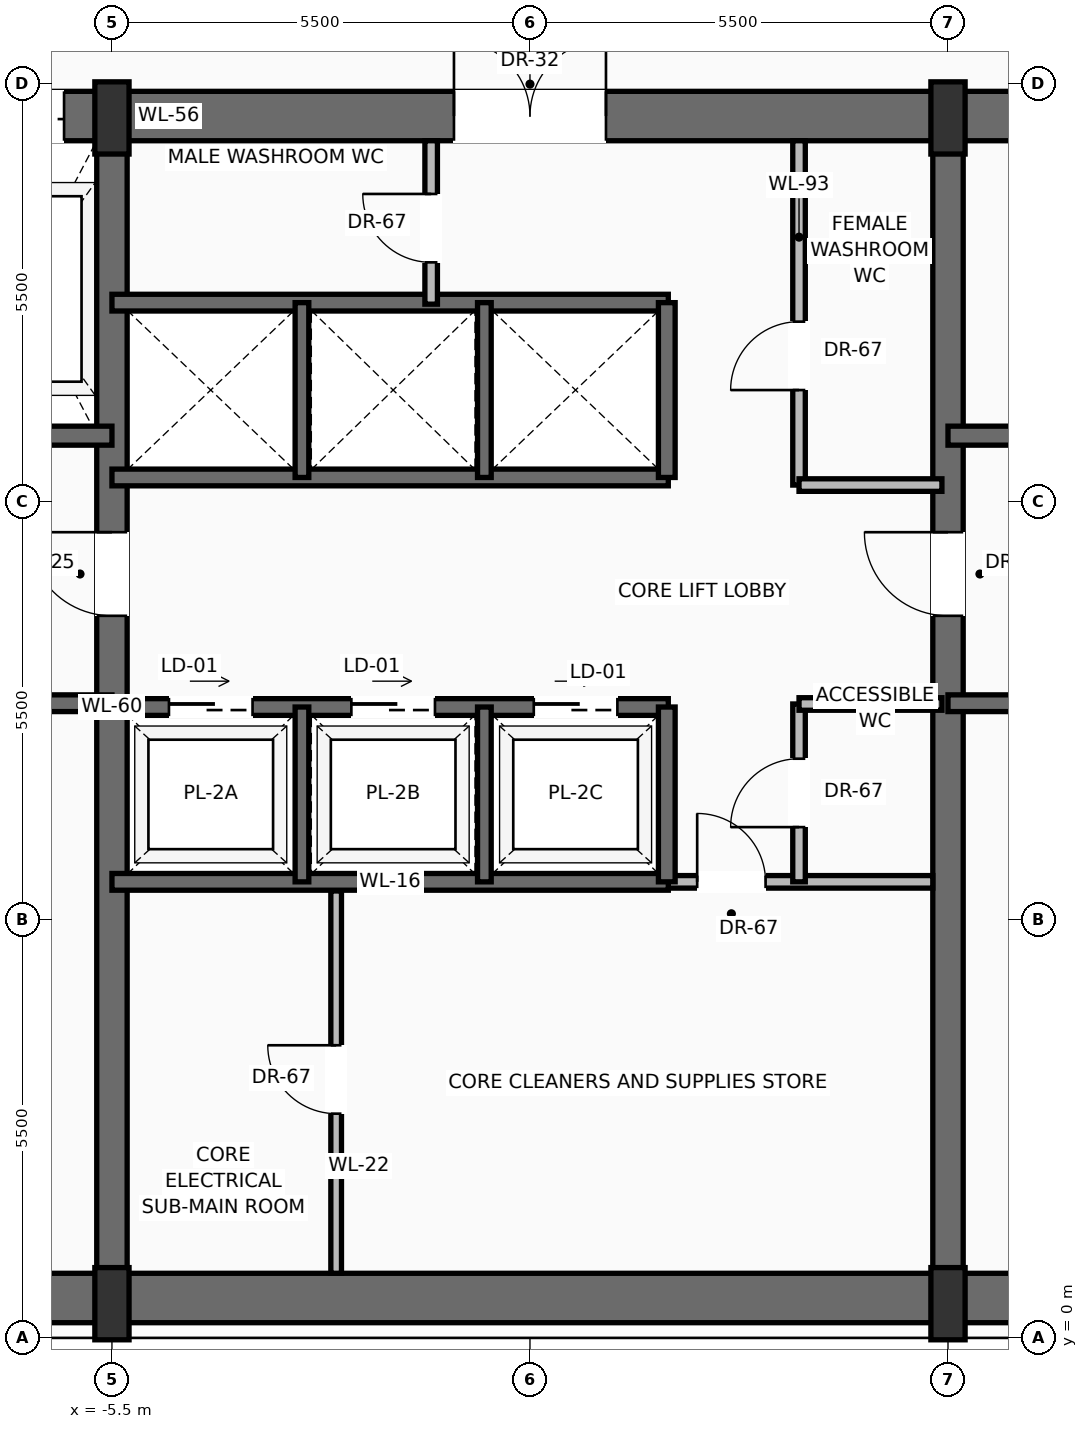
"""IFC4 building model, lengths in metres.
Left out: names, types, materials, properties, quantities, classifications, styles, units other than length and angle.
Written with IfcOpenShell. Run it as: python <this file> out.ifc"""

import sys

from ifc_helpers import new_model, si_unit, direction, frame, frame_2d, origin, origin_2d, place, context, subcontext, project, spatial, rectangle, extrude, source, transform, mapped, element, fill, save


model = new_model("IFC4")
c1 = context("Model", 3, precision=1e-05, world=origin(), true_north=direction((0.0, 1.0)))
c2 = subcontext(c1, "Body", "Model", "MODEL_VIEW")
j1 = project(units=[si_unit("LENGTHUNIT", "METRE"), si_unit("PLANEANGLEUNIT", "RADIAN")], contexts=[c1])
p1 = place(None, origin())
s1 = spatial("IfcSite", under=j1, at=p1, CompositionType="ELEMENT")
p2 = place(p1, origin())
s2 = spatial("IfcBuilding", under=s1, at=p2, CompositionType="ELEMENT")
p3 = place(p2, frame((0.0, 0.0, 204.3)))
s3 = spatial("IfcBuildingStorey", under=s2, at=p3, CompositionType="ELEMENT", Elevation=204.3)
p4 = place(p3, frame((-10.65, 0.525, 0.0), z_axis=(0.0, 0.0, 1.0), x_axis=(1.0, 0.0, 0.0)))
e1 = element("IfcWall", 1, at=p4, inside=s3, PredefinedType="SHEAR", context=c2, shape_type="SweptSolid", body=[
    extrude(rectangle(XDim=21.3, YDim=0.65, at=frame_2d((10.65, 0.0))), origin(), (0.0, 0.0, 1.0), 3.47),
])
p5 = place(p3, frame((-10.8, 16.075, 0.0), z_axis=(0.0, 0.0, 1.0), x_axis=(1.0, 0.0, 0.0)))
e2 = element("IfcWall", 2, at=p5, inside=s3, PredefinedType="SHEAR", context=c2, shape_type="SweptSolid", body=[
    extrude(rectangle(XDim=21.6, YDim=0.65, at=frame_2d((10.8, 0.0))), origin(), (0.0, 0.0, 1.0), 3.47),
])
p6 = place(p5, frame((3.37, 0.0, 0.0)))
e3 = element("IfcOpeningElement", 3, at=p6, cuts=e2, PredefinedType="OPENING", context=c2, shape_type="SweptSolid", body=[
    extrude(rectangle(XDim=1.3, YDim=2.3, at=frame_2d((0.65, 1.15))), frame((0.0, 0.335, 0.0), z_axis=(0.0, -1.0, 0.0), x_axis=(1.0, 0.0, 0.0)), (0.0, 0.0, 1.0), 0.67),
])
p7 = place(p5, frame((9.8, 0.0, 0.0)))
e4 = element("IfcOpeningElement", 4, at=p7, cuts=e2, PredefinedType="OPENING", context=c2, shape_type="SweptSolid", body=[
    extrude(rectangle(XDim=2.0, YDim=2.4, at=frame_2d((1.0, 1.2))), frame((0.0, 0.335, 0.0), z_axis=(0.0, -1.0, 0.0), x_axis=(1.0, 0.0, 0.0)), (0.0, 0.0, 1.0), 0.67),
])
p8 = place(p3, frame((-5.5, 0.525, 0.0), z_axis=(0.0, 0.0, 1.0), x_axis=(0.0, 1.0, 0.0)))
e5 = element("IfcWall", 5, at=p8, inside=s3, PredefinedType="SHEAR", context=c2, shape_type="SweptSolid", body=[
    extrude(rectangle(XDim=15.55, YDim=0.4, at=frame_2d((7.775, 0.0))), origin(), (0.0, 0.0, 1.0), 3.47),
])
p9 = place(p8, frame((8.975, 0.0, 0.0)))
e6 = element("IfcOpeningElement", 6, at=p9, cuts=e5, PredefinedType="OPENING", context=c2, shape_type="SweptSolid", body=[
    extrude(rectangle(XDim=1.1, YDim=2.2, at=frame_2d((0.55, 1.1))), frame((0.0, 0.21, 0.0), z_axis=(0.0, -1.0, 0.0), x_axis=(1.0, 0.0, 0.0)), (0.0, 0.0, 1.0), 0.42),
])
p10 = place(p3, frame((5.5, 0.525, 0.0), z_axis=(0.0, 0.0, 1.0), x_axis=(0.0, 1.0, 0.0)))
e7 = element("IfcWall", 7, at=p10, inside=s3, PredefinedType="SHEAR", context=c2, shape_type="SweptSolid", body=[
    extrude(rectangle(XDim=15.55, YDim=0.4, at=frame_2d((7.775, 0.0))), origin(), (0.0, 0.0, 1.0), 3.47),
])
p11 = place(p10, frame((8.975, 0.0, 0.0)))
e8 = element("IfcOpeningElement", 8, at=p11, cuts=e7, PredefinedType="OPENING", context=c2, shape_type="SweptSolid", body=[
    extrude(rectangle(XDim=1.1, YDim=2.2, at=frame_2d((0.55, 1.1))), frame((0.0, 0.21, 0.0), z_axis=(0.0, -1.0, 0.0), x_axis=(1.0, 0.0, 0.0)), (0.0, 0.0, 1.0), 0.42),
])
m1 = source(origin(), c2, "Body", "SweptSolid", [
    extrude(rectangle(XDim=0.45, YDim=0.95, at=origin_2d()), origin(), (0.0, 0.0, 1.0), 3.7),
])
for number, where, z_axis, x_axis in (
    (9, (-5.5, 0.45, 0.0), (0.0, 0.0, 1.0), (1.0, 0.0, 0.0)),
    (10, (5.5, 0.45, 0.0), (0.0, 0.0, 1.0), (1.0, 0.0, 0.0)),
    (11, (-5.5, 16.05, 0.0), (0.0, 0.0, 1.0), (1.0, 0.0, 0.0)),
    (12, (5.5, 16.05, 0.0), (0.0, 0.0, 1.0), (1.0, 0.0, 0.0)),
):
    element("IfcColumn", number, at=place(p3, frame(where, z_axis=z_axis, x_axis=x_axis)), inside=s3, PredefinedType="PILASTER", context=c2, shape_type="MappedRepresentation", body=[
        mapped(m1, transform((0.0, 0.0, 0.0), scale=1.0)),
    ])
p12 = place(p3, frame((-5.5, 8.35, 0.0), z_axis=(0.0, 0.0, 1.0), x_axis=(-1.0, 0.0, 0.0)))
e13 = element("IfcWall", 13, at=p12, inside=s3, PredefinedType="SOLIDWALL", context=c2, shape_type="SweptSolid", body=[
    extrude(rectangle(XDim=4.65, YDim=0.22, at=frame_2d((2.325, 0.0))), origin(), (0.0, 0.0, 1.0), 3.47),
])
p13 = place(p12, frame((2.5, 0.0, 0.0)))
e14 = element("IfcOpeningElement", 14, at=p13, cuts=e13, PredefinedType="OPENING", context=c2, shape_type="SweptSolid", body=[
    extrude(rectangle(XDim=1.15, YDim=2.2, at=frame_2d((0.575, 1.1))), frame((0.0, 0.12, 0.0), z_axis=(0.0, -1.0, 0.0), x_axis=(1.0, 0.0, 0.0)), (0.0, 0.0, 1.0), 0.24),
])
p14 = place(p3, frame((-5.5, 11.87, 0.0), z_axis=(0.0, 0.0, 1.0), x_axis=(-1.0, 0.0, 0.0)))
e15 = element("IfcWall", 15, at=p14, inside=s3, PredefinedType="SOLIDWALL", context=c2, shape_type="SweptSolid", body=[
    extrude(rectangle(XDim=4.65, YDim=0.25, at=frame_2d((2.325, 0.0))), origin(), (0.0, 0.0, 1.0), 3.47),
])
p15 = place(p14, frame((2.95, 0.0, 0.0)))
e16 = element("IfcOpeningElement", 16, at=p15, cuts=e15, PredefinedType="OPENING", context=c2, shape_type="SweptSolid", body=[
    extrude(rectangle(XDim=1.2, YDim=2.25, at=frame_2d((0.6, 1.125))), frame((0.0, 0.135, 0.0), z_axis=(0.0, -1.0, 0.0), x_axis=(1.0, 0.0, 0.0)), (0.0, 0.0, 1.0), 0.27),
])
p16 = place(p3, frame((10.15, 8.35, 0.0), z_axis=(0.0, 0.0, 1.0), x_axis=(-1.0, 0.0, 0.0)))
e17 = element("IfcWall", 17, at=p16, inside=s3, PredefinedType="SOLIDWALL", context=c2, shape_type="SweptSolid", body=[
    extrude(rectangle(XDim=4.65, YDim=0.22, at=frame_2d((2.325, 0.0))), origin(), (0.0, 0.0, 1.0), 3.47),
])
p17 = place(p16, frame((1.0, 0.0, 0.0)))
e18 = element("IfcOpeningElement", 18, at=p17, cuts=e17, PredefinedType="OPENING", context=c2, shape_type="SweptSolid", body=[
    extrude(rectangle(XDim=1.15, YDim=2.2, at=frame_2d((0.575, 1.1))), frame((0.0, 0.12, 0.0), z_axis=(0.0, -1.0, 0.0), x_axis=(1.0, 0.0, 0.0)), (0.0, 0.0, 1.0), 0.24),
])
p18 = place(p3, frame((10.15, 11.87, 0.0), z_axis=(0.0, 0.0, 1.0), x_axis=(-1.0, 0.0, 0.0)))
e19 = element("IfcWall", 19, at=p18, inside=s3, PredefinedType="SOLIDWALL", context=c2, shape_type="SweptSolid", body=[
    extrude(rectangle(XDim=4.65, YDim=0.25, at=frame_2d((2.325, 0.0))), origin(), (0.0, 0.0, 1.0), 3.47),
])
p19 = place(p18, frame((0.5, 0.0, 0.0)))
e20 = element("IfcOpeningElement", 20, at=p19, cuts=e19, PredefinedType="OPENING", context=c2, shape_type="SweptSolid", body=[
    extrude(rectangle(XDim=1.2, YDim=2.25, at=frame_2d((0.6, 1.125))), frame((0.0, 0.135, 0.0), z_axis=(0.0, -1.0, 0.0), x_axis=(1.0, 0.0, 0.0)), (0.0, 0.0, 1.0), 0.27),
])
p20 = place(p3, frame((1.82, 6.0, 0.0), z_axis=(0.0, 0.0, 1.0), x_axis=(1.0, 0.0, 0.0)))
e21 = element("IfcWall", 21, at=p20, inside=s3, PredefinedType="PARTITIONING", context=c2, shape_type="SweptSolid", body=[
    extrude(rectangle(XDim=3.48, YDim=0.165, at=frame_2d((1.74, 0.0))), origin(), (0.0, 0.0, 1.0), 3.462),
])
p21 = place(p20, frame((0.38, 0.0, 0.0)))
e22 = element("IfcOpeningElement", 22, at=p21, cuts=e21, PredefinedType="OPENING", context=c2, shape_type="SweptSolid", body=[
    extrude(rectangle(XDim=0.9, YDim=2.1, at=frame_2d((0.45, 1.05))), frame((0.0, 0.093, 0.0), z_axis=(0.0, -1.0, 0.0), x_axis=(1.0, 0.0, 0.0)), (0.0, 0.0, 1.0), 0.185),
])
p22 = place(p3, frame((-2.55, 0.85, 0.0), z_axis=(0.0, 0.0, 1.0), x_axis=(0.0, 1.0, 0.0)))
e23 = element("IfcWall", 23, at=p22, inside=s3, PredefinedType="PARTITIONING", context=c2, shape_type="SweptSolid", body=[
    extrude(rectangle(XDim=5.03, YDim=0.14, at=frame_2d((2.515, 0.0))), origin(), (0.0, 0.0, 1.0), 3.462),
])
p23 = place(p22, frame((2.1, 0.0, 0.0)))
e24 = element("IfcOpeningElement", 24, at=p23, cuts=e23, PredefinedType="OPENING", context=c2, shape_type="SweptSolid", body=[
    extrude(rectangle(XDim=0.9, YDim=2.1, at=frame_2d((0.45, 1.05))), frame((0.0, 0.08, 0.0), z_axis=(0.0, -1.0, 0.0), x_axis=(1.0, 0.0, 0.0)), (0.0, 0.0, 1.0), 0.16),
])
p24 = place(p3, frame((3.54, 6.0, 0.0), z_axis=(0.0, 0.0, 1.0), x_axis=(0.0, 1.0, 0.0)))
e25 = element("IfcWall", 25, at=p24, inside=s3, PredefinedType="PARTITIONING", context=c2, shape_type="SweptSolid", body=[
    extrude(rectangle(XDim=2.34, YDim=0.165, at=frame_2d((1.17, 0.0))), origin(), (0.0, 0.0, 1.0), 3.462),
])
p25 = place(p24, frame((0.72, 0.0, 0.0)))
e26 = element("IfcOpeningElement", 26, at=p25, cuts=e25, PredefinedType="OPENING", context=c2, shape_type="SweptSolid", body=[
    extrude(rectangle(XDim=0.9, YDim=2.1, at=frame_2d((0.45, 1.05))), frame((0.0, 0.093, 0.0), z_axis=(0.0, -1.0, 0.0), x_axis=(1.0, 0.0, 0.0)), (0.0, 0.0, 1.0), 0.185),
])
p26 = place(p3, frame((3.54, 8.34, 0.0), z_axis=(0.0, 0.0, 1.0), x_axis=(1.0, 0.0, 0.0)))
e27 = element("IfcWall", 27, at=p26, inside=s3, PredefinedType="PARTITIONING", context=c2, shape_type="SweptSolid", body=[
    extrude(rectangle(XDim=1.88, YDim=0.165, at=frame_2d((0.94, 0.0))), origin(), (0.0, 0.0, 1.0), 3.462),
])
p27 = place(p3, frame((-5.5, 6.0, 0.0), z_axis=(0.0, 0.0, 1.0), x_axis=(1.0, 0.0, 0.0)))
e28 = element("IfcWall", 28, at=p27, inside=s3, PredefinedType="SOLIDWALL", context=c2, shape_type="SweptSolid", body=[
    extrude(rectangle(XDim=7.32, YDim=0.22, at=frame_2d((3.66, 0.0))), origin(), (0.0, 0.0, 1.0), 3.47),
])
p28 = place(p3, frame((-5.5, 8.3, 0.0), z_axis=(0.0, 0.0, 1.0), x_axis=(1.0, 0.0, 0.0)))
e29 = element("IfcWall", 29, at=p28, inside=s3, PredefinedType="SOLIDWALL", context=c2, shape_type="SweptSolid", body=[
    extrude(rectangle(XDim=7.32, YDim=0.22, at=frame_2d((3.66, 0.0))), origin(), (0.0, 0.0, 1.0), 3.47),
])
p29 = place(p28, frame((0.75, 0.0, 0.0)))
e30 = element("IfcOpeningElement", 30, at=p29, cuts=e29, PredefinedType="OPENING", context=c2, shape_type="SweptSolid", body=[
    extrude(rectangle(XDim=1.1, YDim=2.2, at=frame_2d((0.55, 1.1))), frame((0.0, 0.12, 0.0), z_axis=(0.0, -1.0, 0.0), x_axis=(1.0, 0.0, 0.0)), (0.0, 0.0, 1.0), 0.24),
])
p30 = place(p28, frame((3.15, 0.0, 0.0)))
e31 = element("IfcOpeningElement", 31, at=p30, cuts=e29, PredefinedType="OPENING", context=c2, shape_type="SweptSolid", body=[
    extrude(rectangle(XDim=1.1, YDim=2.2, at=frame_2d((0.55, 1.1))), frame((0.0, 0.12, 0.0), z_axis=(0.0, -1.0, 0.0), x_axis=(1.0, 0.0, 0.0)), (0.0, 0.0, 1.0), 0.24),
])
p31 = place(p28, frame((5.55, 0.0, 0.0)))
e32 = element("IfcOpeningElement", 32, at=p31, cuts=e29, PredefinedType="OPENING", context=c2, shape_type="SweptSolid", body=[
    extrude(rectangle(XDim=1.1, YDim=2.2, at=frame_2d((0.55, 1.1))), frame((0.0, 0.12, 0.0), z_axis=(0.0, -1.0, 0.0), x_axis=(1.0, 0.0, 0.0)), (0.0, 0.0, 1.0), 0.24),
])
p32 = place(p3, frame((1.8, 6.0, 0.0), z_axis=(0.0, 0.0, 1.0), x_axis=(0.0, 1.0, 0.0)))
e33 = element("IfcWall", 33, at=p32, inside=s3, PredefinedType="SOLIDWALL", context=c2, shape_type="SweptSolid", body=[
    extrude(rectangle(XDim=2.3, YDim=0.22, at=frame_2d((1.15, 0.0))), origin(), (0.0, 0.0, 1.0), 3.47),
])
for number, where, z_axis, x_axis in (
    (34, (-3.0, 6.0, 0.0), (0.0, 0.0, 1.0), (0.0, 1.0, 0.0)),
    (35, (-0.6, 6.0, 0.0), (0.0, 0.0, 1.0), (0.0, 1.0, 0.0)),
):
    element("IfcWall", number, at=place(p3, frame(where, z_axis=z_axis, x_axis=x_axis)), inside=s3, PredefinedType="SOLIDWALL", context=c2, shape_type="SweptSolid", body=[
        extrude(rectangle(XDim=2.3, YDim=0.18, at=frame_2d((1.15, 0.0))), origin(), (0.0, 0.0, 1.0), 3.47),
    ])
for number, where, z_axis, x_axis in (
    (36, (-5.5, 11.32, 0.0), (0.0, 0.0, 1.0), (1.0, 0.0, 0.0)),
    (37, (-5.5, 13.62, 0.0), (0.0, 0.0, 1.0), (1.0, 0.0, 0.0)),
):
    element("IfcWall", number, at=place(p3, frame(where, z_axis=z_axis, x_axis=x_axis)), inside=s3, PredefinedType="SOLIDWALL", context=c2, shape_type="SweptSolid", body=[
        extrude(rectangle(XDim=7.32, YDim=0.22, at=frame_2d((3.66, 0.0))), origin(), (0.0, 0.0, 1.0), 3.47),
    ])
p33 = place(p3, frame((1.8, 11.32, 0.0), z_axis=(0.0, 0.0, 1.0), x_axis=(0.0, 1.0, 0.0)))
e38 = element("IfcWall", 38, at=p33, inside=s3, PredefinedType="SOLIDWALL", context=c2, shape_type="SweptSolid", body=[
    extrude(rectangle(XDim=2.3, YDim=0.22, at=frame_2d((1.15, 0.0))), origin(), (0.0, 0.0, 1.0), 3.47),
])
for number, where, z_axis, x_axis in (
    (39, (-3.0, 11.32, 0.0), (0.0, 0.0, 1.0), (0.0, 1.0, 0.0)),
    (40, (-0.6, 11.32, 0.0), (0.0, 0.0, 1.0), (0.0, 1.0, 0.0)),
):
    element("IfcWall", number, at=place(p3, frame(where, z_axis=z_axis, x_axis=x_axis)), inside=s3, PredefinedType="SOLIDWALL", context=c2, shape_type="SweptSolid", body=[
        extrude(rectangle(XDim=2.3, YDim=0.18, at=frame_2d((1.15, 0.0))), origin(), (0.0, 0.0, 1.0), 3.47),
    ])
p34 = place(p3, frame((-1.3, 13.6, 0.0), z_axis=(0.0, 0.0, 1.0), x_axis=(0.0, 1.0, 0.0)))
e41 = element("IfcWall", 41, at=p34, inside=s3, PredefinedType="PARTITIONING", context=c2, shape_type="SweptSolid", body=[
    extrude(rectangle(XDim=2.15, YDim=0.165, at=frame_2d((1.075, 0.0))), origin(), (0.0, 0.0, 1.0), 3.462),
])
p35 = place(p34, frame((0.55, 0.0, 0.0)))
e42 = element("IfcOpeningElement", 42, at=p35, cuts=e41, PredefinedType="OPENING", context=c2, shape_type="SweptSolid", body=[
    extrude(rectangle(XDim=0.9, YDim=2.1, at=frame_2d((0.45, 1.05))), frame((0.0, 0.093, 0.0), z_axis=(0.0, -1.0, 0.0), x_axis=(1.0, 0.0, 0.0)), (0.0, 0.0, 1.0), 0.185),
])
p36 = place(p3, frame((3.54, 11.22, 0.0), z_axis=(0.0, 0.0, 1.0), x_axis=(0.0, 1.0, 0.0)))
e43 = element("IfcWall", 43, at=p36, inside=s3, PredefinedType="PARTITIONING", context=c2, shape_type="SweptSolid", body=[
    extrude(rectangle(XDim=4.53, YDim=0.165, at=frame_2d((2.265, 0.0))), origin(), (0.0, 0.0, 1.0), 3.462),
])
p37 = place(p36, frame((1.25, 0.0, 0.0)))
e44 = element("IfcOpeningElement", 44, at=p37, cuts=e43, PredefinedType="OPENING", context=c2, shape_type="SweptSolid", body=[
    extrude(rectangle(XDim=0.9, YDim=2.1, at=frame_2d((0.45, 1.05))), frame((0.0, 0.093, 0.0), z_axis=(0.0, -1.0, 0.0), x_axis=(1.0, 0.0, 0.0)), (0.0, 0.0, 1.0), 0.185),
])
p38 = place(p3, frame((3.54, 11.22, 0.0), z_axis=(0.0, 0.0, 1.0), x_axis=(1.0, 0.0, 0.0)))
e45 = element("IfcWall", 45, at=p38, inside=s3, PredefinedType="PARTITIONING", context=c2, shape_type="SweptSolid", body=[
    extrude(rectangle(XDim=1.88, YDim=0.165, at=frame_2d((0.94, 0.0))), origin(), (0.0, 0.0, 1.0), 3.462),
])
m2 = source(origin(), c2, "Body", "SweptSolid", [
    extrude(rectangle(XDim=1.1, YDim=2.2, at=frame_2d((0.55, 1.1))), frame((0.0, 0.025, 0.0), z_axis=(0.0, -1.0, 0.0), x_axis=(1.0, 0.0, 0.0)), (0.0, 0.0, 1.0), 0.05),
])
p39 = place(p9, origin())
e46 = element("IfcDoor", 46, at=p39, inside=s3, OperationType="SINGLE_SWING_RIGHT", PredefinedType="DOOR", context=c2, shape_type="MappedRepresentation", body=[
    mapped(m2, transform((0.0, 0.0, 0.0), scale=1.0)),
])
fill(e6, e46)
m3 = source(origin(), c2, "Body", "SweptSolid", [
    extrude(rectangle(XDim=1.3, YDim=2.3, at=frame_2d((0.65, 1.15))), frame((0.0, 0.025, 0.0), z_axis=(0.0, -1.0, 0.0), x_axis=(1.0, 0.0, 0.0)), (0.0, 0.0, 1.0), 0.05),
])
p40 = place(p6, origin())
e47 = element("IfcDoor", 47, at=p40, inside=s3, OperationType="SLIDING_TO_RIGHT", PredefinedType="DOOR", context=c2, shape_type="MappedRepresentation", body=[
    mapped(m3, transform((0.0, 0.0, 0.0), scale=1.0)),
])
fill(e3, e47)
p41 = place(p11, origin())
e48 = element("IfcDoor", 48, at=p41, inside=s3, OperationType="SINGLE_SWING_RIGHT", PredefinedType="DOOR", context=c2, shape_type="MappedRepresentation", body=[
    mapped(m2, transform((0.0, 0.0, 0.0), scale=1.0)),
])
fill(e8, e48)
m4 = source(origin(), c2, "Body", "SweptSolid", [
    extrude(rectangle(XDim=2.0, YDim=2.4, at=frame_2d((1.0, 1.2))), frame((0.0, 0.025, 0.0), z_axis=(0.0, -1.0, 0.0), x_axis=(1.0, 0.0, 0.0)), (0.0, 0.0, 1.0), 0.05),
])
p42 = place(p7, origin())
e49 = element("IfcDoor", 49, at=p42, inside=s3, OperationType="DOUBLE_DOOR_SINGLE_SWING", PredefinedType="DOOR", context=c2, shape_type="MappedRepresentation", body=[
    mapped(m4, transform((0.0, 0.0, 0.0), scale=1.0)),
])
fill(e4, e49)
m5 = source(origin(), c2, "Body", "SweptSolid", [
    extrude(rectangle(XDim=0.9, YDim=2.1, at=frame_2d((0.45, 1.05))), frame((0.0, 0.025, 0.0), z_axis=(0.0, -1.0, 0.0), x_axis=(1.0, 0.0, 0.0)), (0.0, 0.0, 1.0), 0.05),
])
p43 = place(p21, origin())
e50 = element("IfcDoor", 50, at=p43, inside=s3, OperationType="SINGLE_SWING_LEFT", PredefinedType="DOOR", context=c2, shape_type="MappedRepresentation", body=[
    mapped(m5, transform((0.0, 0.0, 0.0), scale=1.0)),
])
fill(e22, e50)
p44 = place(p23, origin())
e51 = element("IfcDoor", 51, at=p44, inside=s3, OperationType="SINGLE_SWING_RIGHT", PredefinedType="DOOR", context=c2, shape_type="MappedRepresentation", body=[
    mapped(m5, transform((0.0, 0.0, 0.0), scale=1.0)),
])
fill(e24, e51)
p45 = place(p25, origin())
e52 = element("IfcDoor", 52, at=p45, inside=s3, OperationType="SINGLE_SWING_LEFT", PredefinedType="DOOR", context=c2, shape_type="MappedRepresentation", body=[
    mapped(m5, transform((0.0, 0.0, 0.0), scale=1.0)),
])
fill(e26, e52)
m6 = source(origin(), c2, "Body", "SweptSolid", [
    extrude(rectangle(XDim=1.1, YDim=2.2, at=frame_2d((0.55, 1.1))), frame((0.0, 0.025, 0.0), z_axis=(0.0, -1.0, 0.0), x_axis=(1.0, 0.0, 0.0)), (0.0, 0.0, 1.0), 0.05),
])
p46 = place(p29, origin())
e53 = element("IfcDoor", 53, at=p46, inside=s3, OperationType="SLIDING_TO_LEFT", PredefinedType="DOOR", context=c2, shape_type="MappedRepresentation", body=[
    mapped(m6, transform((0.0, 0.0, 0.0), scale=1.0)),
])
fill(e30, e53)
p47 = place(p30, origin())
e54 = element("IfcDoor", 54, at=p47, inside=s3, OperationType="SLIDING_TO_LEFT", PredefinedType="DOOR", context=c2, shape_type="MappedRepresentation", body=[
    mapped(m6, transform((0.0, 0.0, 0.0), scale=1.0)),
])
fill(e31, e54)
p48 = place(p31, origin())
e55 = element("IfcDoor", 55, at=p48, inside=s3, OperationType="SLIDING_TO_LEFT", PredefinedType="DOOR", context=c2, shape_type="MappedRepresentation", body=[
    mapped(m6, transform((0.0, 0.0, 0.0), scale=1.0)),
])
fill(e32, e55)
p49 = place(p35, origin())
e56 = element("IfcDoor", 56, at=p49, inside=s3, OperationType="SINGLE_SWING_RIGHT", PredefinedType="DOOR", context=c2, shape_type="MappedRepresentation", body=[
    mapped(m5, transform((0.0, 0.0, 0.0), scale=1.0)),
])
fill(e42, e56)
p50 = place(p37, origin())
e57 = element("IfcDoor", 57, at=p50, inside=s3, OperationType="SINGLE_SWING_LEFT", PredefinedType="DOOR", context=c2, shape_type="MappedRepresentation", body=[
    mapped(m5, transform((0.0, 0.0, 0.0), scale=1.0)),
])
fill(e44, e57)
save(model, sys.argv[1])
